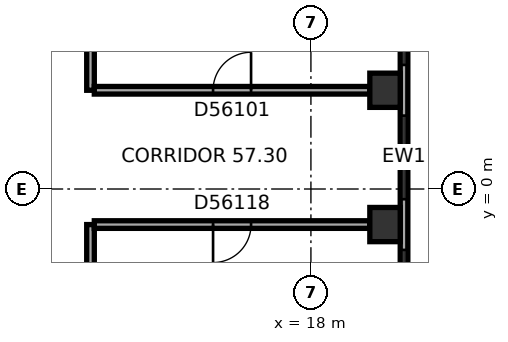
"""IFC4 building model, lengths in metres.
Left out: names, types, materials, properties, quantities, classifications, styles, units other than length and angle.
Written with IfcOpenShell. Run it as: python <this file> out.ifc"""

import sys

from ifc_helpers import new_model, si_unit, direction, frame, frame_2d, origin, origin_2d, place, context, subcontext, project, spatial, rectangle, extrude, element, fill, save


model = new_model("IFC4")
c1 = context("Model", 3, precision=1e-05, world=origin(), true_north=direction((0.0, 1.0)))
c2 = subcontext(c1, "Body", "Model", "MODEL_VIEW")
j1 = project(units=[si_unit("LENGTHUNIT", "METRE"), si_unit("PLANEANGLEUNIT", "RADIAN")], contexts=[c1])
p1 = place(None, origin())
s1 = spatial("IfcSite", under=j1, at=p1, CompositionType="ELEMENT")
p2 = place(p1, origin())
s2 = spatial("IfcBuilding", under=s1, at=p2, CompositionType="ELEMENT")
p3 = place(p2, frame((0.0, 0.0, 232.8)))
s3 = spatial("IfcBuildingStorey", under=s2, at=p3, CompositionType="ELEMENT", Elevation=232.8)
for number, where, z_axis, x_axis in (
    (1, (19.95, -0.936, 0.0), (0.0, 0.0, 1.0), (0.0, 1.0, 0.0)),
    (2, (19.95, 2.598, 0.0), (0.0, 0.0, 1.0), (0.0, 1.0, 0.0)),
):
    element("IfcColumn", number, at=place(p3, frame(where, z_axis=z_axis, x_axis=x_axis)), inside=s3, PredefinedType="COLUMN", context=c2, shape_type="SweptSolid", body=[
        extrude(rectangle(XDim=0.9, YDim=0.8, at=origin_2d()), origin(), (0.0, 0.0, 1.0), 3.7),
    ])
p4 = place(p3, frame((20.45, -8.59, 0.0), z_axis=(0.0, 0.0, 1.0), x_axis=(0.0, 1.0, 0.0)))
e3 = element("IfcWall", 3, at=p4, inside=s3, PredefinedType="STANDARD", context=c2, shape_type="SweptSolid", body=[
    extrude(rectangle(XDim=18.841, YDim=0.2, at=frame_2d((9.421, 0.0))), origin(), (0.0, 0.0, 1.0), 3.7),
])
p5 = place(p4, frame((1.254, 0.0, 0.9)))
e4 = element("IfcOpeningElement", 4, at=p5, cuts=e3, PredefinedType="OPENING", context=c2, shape_type="SweptSolid", body=[
    extrude(rectangle(XDim=2.2, YDim=2.0, at=frame_2d((1.1, 1.0))), frame((0.0, 0.11, 0.0), z_axis=(0.0, -1.0, 0.0), x_axis=(1.0, 0.0, 0.0)), (0.0, 0.0, 1.0), 0.22),
])
p6 = place(p4, frame((4.788, 0.0, 0.9)))
e5 = element("IfcOpeningElement", 5, at=p6, cuts=e3, PredefinedType="OPENING", context=c2, shape_type="SweptSolid", body=[
    extrude(rectangle(XDim=2.2, YDim=2.0, at=frame_2d((1.1, 1.0))), frame((0.0, 0.11, 0.0), z_axis=(0.0, -1.0, 0.0), x_axis=(1.0, 0.0, 0.0)), (0.0, 0.0, 1.0), 0.22),
])
p7 = place(p4, frame((8.322, 0.0, 0.9)))
e6 = element("IfcOpeningElement", 6, at=p7, cuts=e3, PredefinedType="OPENING", context=c2, shape_type="SweptSolid", body=[
    extrude(rectangle(XDim=2.2, YDim=2.0, at=frame_2d((1.1, 1.0))), frame((0.0, 0.11, 0.0), z_axis=(0.0, -1.0, 0.0), x_axis=(1.0, 0.0, 0.0)), (0.0, 0.0, 1.0), 0.22),
])
p8 = place(p4, frame((11.855, 0.0, 0.9)))
e7 = element("IfcOpeningElement", 7, at=p8, cuts=e3, PredefinedType="OPENING", context=c2, shape_type="SweptSolid", body=[
    extrude(rectangle(XDim=2.2, YDim=2.0, at=frame_2d((1.1, 1.0))), frame((0.0, 0.11, 0.0), z_axis=(0.0, -1.0, 0.0), x_axis=(1.0, 0.0, 0.0)), (0.0, 0.0, 1.0), 0.22),
])
p9 = place(p4, frame((15.389, 0.0, 0.9)))
e8 = element("IfcOpeningElement", 8, at=p9, cuts=e3, PredefinedType="OPENING", context=c2, shape_type="SweptSolid", body=[
    extrude(rectangle(XDim=2.2, YDim=2.0, at=frame_2d((1.1, 1.0))), frame((0.0, 0.11, 0.0), z_axis=(0.0, -1.0, 0.0), x_axis=(1.0, 0.0, 0.0)), (0.0, 0.0, 1.0), 0.22),
])
p10 = place(p3, frame((12.2, -5.907, 0.0), z_axis=(0.0, 0.0, 1.0), x_axis=(0.0, 1.0, 0.0)))
e9 = element("IfcWall", 9, at=p10, inside=s3, PredefinedType="PARTITIONING", context=c2, shape_type="SweptSolid", body=[
    extrude(rectangle(XDim=4.971, YDim=0.2, at=frame_2d((2.486, 0.0))), origin(), (0.0, 0.0, 1.0), 3.42),
])
p11 = place(p3, frame((12.2, 2.598, 0.0), z_axis=(0.0, 0.0, 1.0), x_axis=(0.0, 1.0, 0.0)))
e10 = element("IfcWall", 10, at=p11, inside=s3, PredefinedType="PARTITIONING", context=c2, shape_type="SweptSolid", body=[
    extrude(rectangle(XDim=3.349, YDim=0.2, at=frame_2d((1.674, 0.0))), origin(), (0.0, 0.0, 1.0), 3.42),
])
p12 = place(p3, frame((12.3, -0.936, 0.0), z_axis=(0.0, 0.0, 1.0), x_axis=(1.0, 0.0, 0.0)))
e11 = element("IfcWall", 11, at=p12, inside=s3, PredefinedType="PARTITIONING", context=c2, shape_type="SweptSolid", body=[
    extrude(rectangle(XDim=7.25, YDim=0.2, at=frame_2d((3.625, 0.0))), origin(), (0.0, 0.0, 1.0), 2.87),
])
p13 = place(p12, frame((3.125, 0.0, 0.0)))
e12 = element("IfcOpeningElement", 12, at=p13, cuts=e11, PredefinedType="OPENING", context=c2, shape_type="SweptSolid", body=[
    extrude(rectangle(XDim=1.0, YDim=2.1, at=frame_2d((0.5, 1.05))), frame((0.0, 0.11, 0.0), z_axis=(0.0, -1.0, 0.0), x_axis=(1.0, 0.0, 0.0)), (0.0, 0.0, 1.0), 0.22),
])
p14 = place(p3, frame((19.55, 2.598, 0.0), z_axis=(0.0, 0.0, 1.0), x_axis=(-1.0, 0.0, 0.0)))
e13 = element("IfcWall", 13, at=p14, inside=s3, PredefinedType="PARTITIONING", context=c2, shape_type="SweptSolid", body=[
    extrude(rectangle(XDim=7.25, YDim=0.2, at=frame_2d((3.625, 0.0))), origin(), (0.0, 0.0, 1.0), 3.42),
])
p15 = place(p14, frame((3.125, 0.0, 0.0)))
e14 = element("IfcOpeningElement", 14, at=p15, cuts=e13, PredefinedType="OPENING", context=c2, shape_type="SweptSolid", body=[
    extrude(rectangle(XDim=1.0, YDim=2.1, at=frame_2d((0.5, 1.05))), frame((0.0, 0.11, 0.0), z_axis=(0.0, -1.0, 0.0), x_axis=(1.0, 0.0, 0.0)), (0.0, 0.0, 1.0), 0.22),
])
p16 = place(p6, origin())
e15 = element("IfcWindow", 15, at=p16, inside=s3, PartitioningType="SINGLE_PANEL", PredefinedType="WINDOW", context=c2, shape_type="SweptSolid", body=[
    extrude(rectangle(XDim=2.2, YDim=2.0, at=frame_2d((1.1, 1.0))), frame((0.0, 0.03, 0.0), z_axis=(0.0, -1.0, 0.0), x_axis=(1.0, 0.0, 0.0)), (0.0, 0.0, 1.0), 0.06),
])
fill(e5, e15)
p17 = place(p7, origin())
e16 = element("IfcWindow", 16, at=p17, inside=s3, PartitioningType="SINGLE_PANEL", PredefinedType="WINDOW", context=c2, shape_type="SweptSolid", body=[
    extrude(rectangle(XDim=2.2, YDim=2.0, at=frame_2d((1.1, 1.0))), frame((0.0, 0.03, 0.0), z_axis=(0.0, -1.0, 0.0), x_axis=(1.0, 0.0, 0.0)), (0.0, 0.0, 1.0), 0.06),
])
fill(e6, e16)
p18 = place(p8, origin())
e17 = element("IfcWindow", 17, at=p18, inside=s3, PartitioningType="SINGLE_PANEL", PredefinedType="WINDOW", context=c2, shape_type="SweptSolid", body=[
    extrude(rectangle(XDim=2.2, YDim=2.0, at=frame_2d((1.1, 1.0))), frame((0.0, 0.03, 0.0), z_axis=(0.0, -1.0, 0.0), x_axis=(1.0, 0.0, 0.0)), (0.0, 0.0, 1.0), 0.06),
])
fill(e7, e17)
p19 = place(p15, origin())
e18 = element("IfcDoor", 18, at=p19, inside=s3, OperationType="SINGLE_SWING_LEFT", PredefinedType="DOOR", context=c2, shape_type="SweptSolid", body=[
    extrude(rectangle(XDim=1.0, YDim=2.1, at=frame_2d((0.5, 1.05))), frame((0.0, 0.025, 0.0), z_axis=(0.0, -1.0, 0.0), x_axis=(1.0, 0.0, 0.0)), (0.0, 0.0, 1.0), 0.05),
])
fill(e14, e18)
p20 = place(p13, origin())
e19 = element("IfcDoor", 19, at=p20, inside=s3, OperationType="SINGLE_SWING_LEFT", PredefinedType="DOOR", context=c2, shape_type="SweptSolid", body=[
    extrude(rectangle(XDim=1.0, YDim=2.1, at=frame_2d((0.5, 1.05))), frame((0.0, 0.025, 0.0), z_axis=(0.0, -1.0, 0.0), x_axis=(1.0, 0.0, 0.0)), (0.0, 0.0, 1.0), 0.05),
])
fill(e12, e19)
save(model, sys.argv[1])
